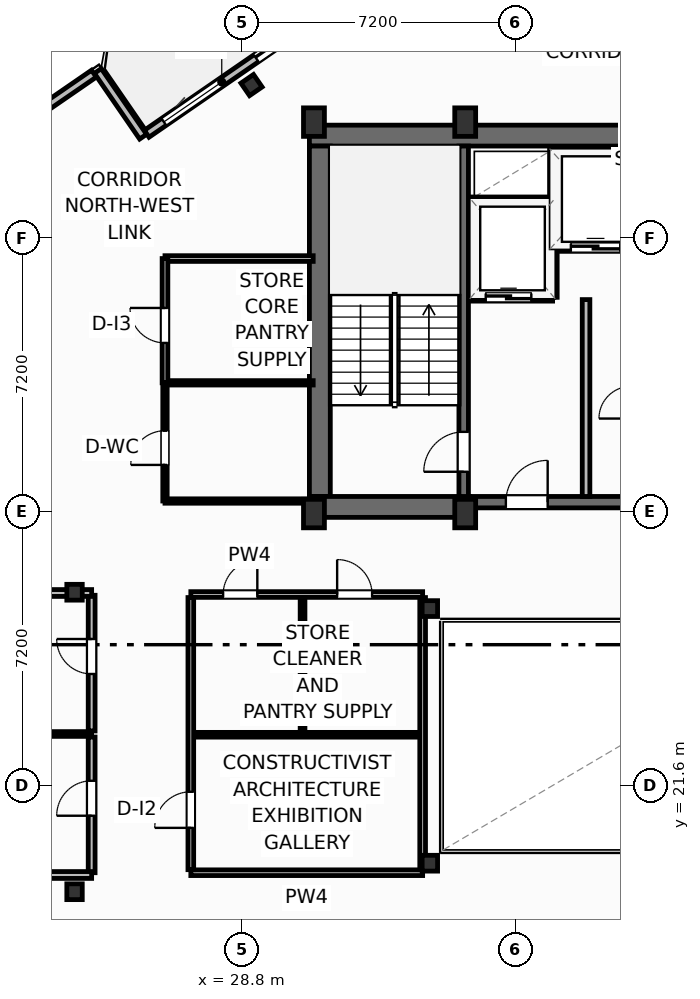
"""IFC4 building model, lengths in metres.
Left out: names, types, materials, properties, quantities, classifications, styles, units other than length and angle.
Written with IfcOpenShell. Run it as: python <this file> out.ifc"""

import sys

from ifc_helpers import new_model, si_unit, direction, frame, frame_2d, origin, origin_2d, place, context, subcontext, project, spatial, rectangle, i_section, extrude, element, fill, save


model = new_model("IFC4")
c1 = context("Model", 3, precision=1e-05, world=origin(), true_north=direction((0.0, 1.0)))
c2 = subcontext(c1, "Body", "Model", "MODEL_VIEW")
j1 = project(units=[si_unit("LENGTHUNIT", "METRE"), si_unit("PLANEANGLEUNIT", "RADIAN")], contexts=[c1])
p1 = place(None, origin())
s1 = spatial("IfcSite", under=j1, at=p1, CompositionType="ELEMENT")
p2 = place(p1, origin())
s2 = spatial("IfcBuilding", under=s1, at=p2, CompositionType="ELEMENT")
p3 = place(p2, frame((0.0, 0.0, 273.0)))
s3 = spatial("IfcBuildingStorey", under=s2, at=p3, CompositionType="ELEMENT", Elevation=273.0)
for number, where, z_axis, x_axis in (
    (1, (30.7, 28.75, 0.0), (0.0, 0.0, 1.0), (1.0, 0.0, 0.0)),
    (2, (34.68, 28.75, 0.0), (0.0, 0.0, 1.0), (1.0, 0.0, 0.0)),
    (3, (30.7, 39.05, 0.0), (0.0, 0.0, 1.0), (1.0, 0.0, 0.0)),
    (4, (34.68, 39.05, 0.0), (0.0, 0.0, 1.0), (1.0, 0.0, 0.0)),
):
    element("IfcColumn", number, at=place(p3, frame(where, z_axis=z_axis, x_axis=x_axis)), inside=s3, PredefinedType="COLUMN", context=c2, shape_type="SweptSolid", body=[
        extrude(rectangle(XDim=0.55, YDim=0.75, at=origin_2d()), origin(), (0.0, 0.0, 1.0), 3.7),
    ])
for number, where, z_axis, x_axis in (
    (5, (33.75, 19.55, 0.0), (0.0, 0.0, 1.0), (1.0, 0.0, 0.0)),
    (6, (33.75, 26.25, 0.0), (0.0, 0.0, 1.0), (1.0, 0.0, 0.0)),
    (7, (24.4, 18.8, 0.0), (0.0, 0.0, 1.0), (1.0, 0.0, 0.0)),
    (8, (24.4, 26.68, 0.0), (0.0, 0.0, 1.0), (1.0, 0.0, 0.0)),
):
    element("IfcColumn", number, at=place(p3, frame(where, z_axis=z_axis, x_axis=x_axis)), inside=s3, PredefinedType="COLUMN", context=c2, shape_type="SweptSolid", body=[
        extrude(i_section(OverallWidth=0.406, OverallDepth=0.416, WebThickness=0.03, FlangeThickness=0.048, FilletRadius=0.025, at=origin_2d()), origin(), (0.0, 0.0, 1.0), 3.7),
    ])
p4 = place(p3, frame((30.58, 38.695, 0.0), z_axis=(0.0, 0.0, 1.0), x_axis=(1.0, 0.0, 0.0)))
e9 = element("IfcWall", 9, at=p4, inside=s3, PredefinedType="SHEAR", context=c2, shape_type="SweptSolid", body=[
    extrude(rectangle(XDim=17.24, YDim=0.55, at=frame_2d((8.62, 0.0))), origin(), (0.0, 0.0, 1.0), 3.45),
])
p5 = place(p3, frame((30.855, 29.2, 0.0), z_axis=(0.0, 0.0, 1.0), x_axis=(0.0, 1.0, 0.0)))
e10 = element("IfcWall", 10, at=p5, inside=s3, PredefinedType="SHEAR", context=c2, shape_type="SweptSolid", body=[
    extrude(rectangle(XDim=9.22, YDim=0.55, at=frame_2d((4.61, 0.0))), origin(), (0.0, 0.0, 1.0), 3.45),
])
p6 = place(p3, frame((30.58, 28.925, 0.0), z_axis=(0.0, 0.0, 1.0), x_axis=(1.0, 0.0, 0.0)))
e11 = element("IfcWall", 11, at=p6, inside=s3, PredefinedType="SHEAR", context=c2, shape_type="SweptSolid", body=[
    extrude(rectangle(XDim=4.22, YDim=0.55, at=frame_2d((2.11, 0.0))), origin(), (0.0, 0.0, 1.0), 3.45),
])
p7 = place(p3, frame((34.8, 29.05, 0.0), z_axis=(0.0, 0.0, 1.0), x_axis=(1.0, 0.0, 0.0)))
e12 = element("IfcWall", 12, at=p7, inside=s3, PredefinedType="SHEAR", context=c2, shape_type="SweptSolid", body=[
    extrude(rectangle(XDim=8.8, YDim=0.3, at=frame_2d((4.4, 0.0))), origin(), (0.0, 0.0, 1.0), 3.45),
])
p8 = place(p7, frame((0.95, 0.0, 0.0)))
e13 = element("IfcOpeningElement", 13, at=p8, cuts=e12, PredefinedType="OPENING", context=c2, shape_type="SweptSolid", body=[
    extrude(rectangle(XDim=1.1, YDim=2.15, at=frame_2d((0.55, 1.075))), frame((0.0, 0.16, 0.0), z_axis=(0.0, -1.0, 0.0), x_axis=(1.0, 0.0, 0.0)), (0.0, 0.0, 1.0), 0.32),
])
p9 = place(p7, frame((6.75, 0.0, 0.0)))
e14 = element("IfcOpeningElement", 14, at=p9, cuts=e12, PredefinedType="OPENING", context=c2, shape_type="SweptSolid", body=[
    extrude(rectangle(XDim=1.1, YDim=2.15, at=frame_2d((0.55, 1.075))), frame((0.0, 0.16, 0.0), z_axis=(0.0, -1.0, 0.0), x_axis=(1.0, 0.0, 0.0)), (0.0, 0.0, 1.0), 0.32),
])
p10 = place(p7, frame((4.45, 0.0, 0.0)))
e15 = element("IfcOpeningElement", 15, at=p10, cuts=e12, PredefinedType="OPENING", context=c2, shape_type="SweptSolid", body=[
    extrude(rectangle(XDim=0.95, YDim=2.15, at=frame_2d((0.475, 1.075))), frame((0.0, 0.16, 0.0), z_axis=(0.0, -1.0, 0.0), x_axis=(1.0, 0.0, 0.0)), (0.0, 0.0, 1.0), 0.32),
])
p11 = place(p3, frame((34.64, 29.2, 0.0), z_axis=(0.0, 0.0, 1.0), x_axis=(0.0, 1.0, 0.0)))
e16 = element("IfcWall", 16, at=p11, inside=s3, PredefinedType="SHEAR", context=c2, shape_type="SweptSolid", body=[
    extrude(rectangle(XDim=9.22, YDim=0.25, at=frame_2d((4.61, 0.0))), origin(), (0.0, 0.0, 1.0), 3.45),
])
p12 = place(p11, frame((0.65, 0.0, 0.0)))
e17 = element("IfcOpeningElement", 17, at=p12, cuts=e16, PredefinedType="OPENING", context=c2, shape_type="SweptSolid", body=[
    extrude(rectangle(XDim=1.05, YDim=2.15, at=frame_2d((0.525, 1.075))), frame((0.0, 0.135, 0.0), z_axis=(0.0, -1.0, 0.0), x_axis=(1.0, 0.0, 0.0)), (0.0, 0.0, 1.0), 0.27),
])
p13 = place(p3, frame((29.057, 40.025, 0.0), z_axis=(0.0, 0.0, 1.0), x_axis=(0.823532597628, 0.567268949127, 0.0)))
e18 = element("IfcColumn", 18, at=p13, inside=s3, PredefinedType="COLUMN", context=c2, shape_type="SweptSolid", body=[
    extrude(i_section(OverallWidth=0.401, OverallDepth=0.399, WebThickness=0.025, FlangeThickness=0.04, FilletRadius=0.022, at=origin_2d()), origin(), (0.0, 0.0, 1.0), 3.7),
])
p14 = place(p3, frame((26.297, 38.743, 0.0), z_axis=(0.0, 0.0, 1.0), x_axis=(0.823534636215, 0.567265989598, 0.0)))
e19 = element("IfcWall", 19, at=p14, inside=s3, PredefinedType="SOLIDWALL", context=c2, shape_type="SweptSolid", body=[
    extrude(rectangle(XDim=6.0, YDim=0.22, at=frame_2d((3.0, 0.0))), origin(), (0.0, 0.0, 1.0), 2.73),
])
p15 = place(p14, frame((3.5, 0.0, 0.0)))
e20 = element("IfcOpeningElement", 20, at=p15, cuts=e19, PredefinedType="OPENING", context=c2, shape_type="SweptSolid", body=[
    extrude(rectangle(XDim=2.1, YDim=2.3, at=frame_2d((1.05, 1.15))), frame((0.0, 0.12, 0.0), z_axis=(0.0, -1.0, 0.0), x_axis=(1.0, 0.0, 0.0)), (0.0, 0.0, 1.0), 0.24),
])
p16 = place(p14, frame((0.55, 0.0, 0.75)))
e21 = element("IfcOpeningElement", 21, at=p16, cuts=e19, PredefinedType="OPENING", context=c2, shape_type="SweptSolid", body=[
    extrude(rectangle(XDim=1.85, YDim=1.75, at=frame_2d((0.925, 0.875))), frame((0.0, 0.12, 0.0), z_axis=(0.0, -1.0, 0.0), x_axis=(1.0, 0.0, 0.0)), (0.0, 0.0, 1.0), 0.24),
])
p17 = place(p3, frame((26.204, 38.667, 0.0), z_axis=(0.0, 0.0, 1.0), x_axis=(-0.567219383419, 0.823566737474, 0.0)))
e22 = element("IfcWall", 22, at=p17, inside=s3, PredefinedType="SOLIDWALL", context=c2, shape_type="SweptSolid", body=[
    extrude(rectangle(XDim=2.1, YDim=0.22, at=frame_2d((1.05, 0.0))), origin(), (0.0, 0.0, 1.0), 2.73),
])
p18 = place(p3, frame((24.91, 40.325, 0.0), z_axis=(0.0, 0.0, 1.0), x_axis=(-0.823521165086, -0.56728554596, 0.0)))
e23 = element("IfcWall", 23, at=p18, inside=s3, PredefinedType="SOLIDWALL", context=c2, shape_type="SweptSolid", body=[
    extrude(rectangle(XDim=8.035, YDim=0.22, at=frame_2d((4.018, 0.0))), origin(), (0.0, 0.0, 1.0), 2.73),
])
p19 = place(p18, frame((2.968, 0.0, 0.8)))
e24 = element("IfcOpeningElement", 24, at=p19, cuts=e23, PredefinedType="OPENING", context=c2, shape_type="SweptSolid", body=[
    extrude(rectangle(XDim=2.1, YDim=1.75, at=frame_2d((1.05, 0.875))), frame((0.0, 0.12, 0.0), z_axis=(0.0, -1.0, 0.0), x_axis=(1.0, 0.0, 0.0)), (0.0, 0.0, 1.0), 0.24),
])
p20 = place(p3, frame((24.85, 19.3, 0.0), z_axis=(0.0, 0.0, 1.0), x_axis=(0.0, 1.0, 0.0)))
e25 = element("IfcWall", 25, at=p20, inside=s3, PredefinedType="PARTITIONING", context=c2, shape_type="SweptSolid", body=[
    extrude(rectangle(XDim=3.57, YDim=0.18, at=frame_2d((1.785, 0.0))), origin(), (0.0, 0.0, 1.0), 3.45),
])
p21 = place(p20, frame((1.5, 0.0, 0.0)))
e26 = element("IfcOpeningElement", 26, at=p21, cuts=e25, PredefinedType="OPENING", context=c2, shape_type="SweptSolid", body=[
    extrude(rectangle(XDim=0.92, YDim=2.05, at=frame_2d((0.46, 1.025))), frame((0.0, 0.1, 0.0), z_axis=(0.0, -1.0, 0.0), x_axis=(1.0, 0.0, 0.0)), (0.0, 0.0, 1.0), 0.2),
])
p22 = place(p3, frame((24.85, 23.03, 0.0), z_axis=(0.0, 0.0, 1.0), x_axis=(0.0, 1.0, 0.0)))
e27 = element("IfcWall", 27, at=p22, inside=s3, PredefinedType="PARTITIONING", context=c2, shape_type="SweptSolid", body=[
    extrude(rectangle(XDim=3.57, YDim=0.18, at=frame_2d((1.785, 0.0))), origin(), (0.0, 0.0, 1.0), 3.45),
])
p23 = place(p22, frame((1.5, 0.0, 0.0)))
e28 = element("IfcOpeningElement", 28, at=p23, cuts=e27, PredefinedType="OPENING", context=c2, shape_type="SweptSolid", body=[
    extrude(rectangle(XDim=0.92, YDim=2.05, at=frame_2d((0.46, 1.025))), frame((0.0, 0.1, 0.0), z_axis=(0.0, -1.0, 0.0), x_axis=(1.0, 0.0, 0.0)), (0.0, 0.0, 1.0), 0.2),
])
p24 = place(p3, frame((2.424, 22.95, 0.0), z_axis=(0.0, 0.0, 1.0), x_axis=(1.0, 0.0, 0.0)))
e29 = element("IfcWall", 29, at=p24, inside=s3, PredefinedType="PARTITIONING", context=c2, shape_type="SweptSolid", body=[
    extrude(rectangle(XDim=22.426, YDim=0.125, at=frame_2d((11.213, 0.0))), origin(), (0.0, 0.0, 1.0), 3.45),
])
p25 = place(p3, frame((3.392, 19.24, 0.0), z_axis=(0.0, 0.0, 1.0), x_axis=(1.0, 0.0, 0.0)))
e30 = element("IfcWall", 30, at=p25, inside=s3, PredefinedType="PARTITIONING", context=c2, shape_type="SweptSolid", body=[
    extrude(rectangle(XDim=21.458, YDim=0.18, at=frame_2d((10.729, 0.0))), origin(), (0.0, 0.0, 1.0), 3.45),
])
p26 = place(p3, frame((5.107, 26.66, 0.0), z_axis=(0.0, 0.0, 1.0), x_axis=(1.0, 0.0, 0.0)))
e31 = element("IfcWall", 31, at=p26, inside=s3, PredefinedType="PARTITIONING", context=c2, shape_type="SweptSolid", body=[
    extrude(rectangle(XDim=19.743, YDim=0.18, at=frame_2d((9.872, 0.0))), origin(), (0.0, 0.0, 1.0), 2.662),
])
p27 = place(p3, frame((37.86, 29.2, 0.0), z_axis=(0.0, 0.0, 1.0), x_axis=(0.0, 1.0, 0.0)))
e32 = element("IfcWall", 32, at=p27, inside=s3, PredefinedType="PARTITIONING", context=c2, shape_type="SweptSolid", body=[
    extrude(rectangle(XDim=5.18, YDim=0.2, at=frame_2d((2.59, 0.0))), origin(), (0.0, 0.0, 1.0), 3.45),
])
p28 = place(p3, frame((34.8, 34.44, 0.0), z_axis=(0.0, 0.0, 1.0), x_axis=(1.0, 0.0, 0.0)))
e33 = element("IfcWall", 33, at=p28, inside=s3, PredefinedType="PARTITIONING", context=c2, shape_type="SweptSolid", body=[
    extrude(rectangle(XDim=2.18, YDim=0.2, at=frame_2d((1.09, 0.0))), origin(), (0.0, 0.0, 1.0), 3.45),
])
p29 = place(p28, frame((0.42, 0.0, 0.0)))
e34 = element("IfcOpeningElement", 34, at=p29, cuts=e33, PredefinedType="OPENING", context=c2, shape_type="SweptSolid", body=[
    extrude(rectangle(XDim=1.2, YDim=2.2, at=frame_2d((0.6, 1.1))), frame((0.0, 0.11, 0.0), z_axis=(0.0, -1.0, 0.0), x_axis=(1.0, 0.0, 0.0)), (0.0, 0.0, 1.0), 0.22),
])
p30 = place(p3, frame((34.8, 36.98, 0.0), z_axis=(0.0, 0.0, 1.0), x_axis=(1.0, 0.0, 0.0)))
e35 = element("IfcWall", 35, at=p30, inside=s3, PredefinedType="PARTITIONING", context=c2, shape_type="SweptSolid", body=[
    extrude(rectangle(XDim=2.18, YDim=0.2, at=frame_2d((1.09, 0.0))), origin(), (0.0, 0.0, 1.0), 3.45),
])
p31 = place(p3, frame((37.0, 34.44, 0.0), z_axis=(0.0, 0.0, 1.0), x_axis=(0.0, 1.0, 0.0)))
e36 = element("IfcWall", 36, at=p31, inside=s3, PredefinedType="PARTITIONING", context=c2, shape_type="SweptSolid", body=[
    extrude(rectangle(XDim=3.9, YDim=0.2, at=frame_2d((1.95, 0.0))), origin(), (0.0, 0.0, 1.0), 3.45),
])
p32 = place(p3, frame((37.06, 35.75, 0.0), z_axis=(0.0, 0.0, 1.0), x_axis=(1.0, 0.0, 0.0)))
e37 = element("IfcWall", 37, at=p32, inside=s3, PredefinedType="PARTITIONING", context=c2, shape_type="SweptSolid", body=[
    extrude(rectangle(XDim=2.12, YDim=0.2, at=frame_2d((1.06, 0.0))), origin(), (0.0, 0.0, 1.0), 3.45),
])
p33 = place(p32, frame((0.4, 0.0, 0.0)))
e38 = element("IfcOpeningElement", 38, at=p33, cuts=e37, PredefinedType="OPENING", context=c2, shape_type="SweptSolid", body=[
    extrude(rectangle(XDim=1.3, YDim=2.2, at=frame_2d((0.65, 1.1))), frame((0.0, 0.11, 0.0), z_axis=(0.0, -1.0, 0.0), x_axis=(1.0, 0.0, 0.0)), (0.0, 0.0, 1.0), 0.22),
])
p34 = place(p3, frame((27.46, 19.3, 0.0), z_axis=(0.0, 0.0, 1.0), x_axis=(1.0, 0.0, 0.0)))
e39 = element("IfcWall", 39, at=p34, inside=s3, PredefinedType="PARTITIONING", context=c2, shape_type="SweptSolid", body=[
    extrude(rectangle(XDim=6.1, YDim=0.15, at=frame_2d((3.05, 0.0))), origin(), (0.0, 0.0, 1.0), 2.662),
])
p35 = place(p3, frame((27.46, 26.62, 0.0), z_axis=(0.0, 0.0, 1.0), x_axis=(1.0, 0.0, 0.0)))
e40 = element("IfcWall", 40, at=p35, inside=s3, PredefinedType="PARTITIONING", context=c2, shape_type="SweptSolid", body=[
    extrude(rectangle(XDim=6.1, YDim=0.15, at=frame_2d((3.05, 0.0))), origin(), (0.0, 0.0, 1.0), 2.662),
])
p36 = place(p35, frame((0.85, 0.0, 0.0)))
e41 = element("IfcOpeningElement", 41, at=p36, cuts=e40, PredefinedType="OPENING", context=c2, shape_type="SweptSolid", body=[
    extrude(rectangle(XDim=0.9, YDim=2.05, at=frame_2d((0.45, 1.025))), frame((0.0, 0.085, 0.0), z_axis=(0.0, -1.0, 0.0), x_axis=(1.0, 0.0, 0.0)), (0.0, 0.0, 1.0), 0.17),
])
p37 = place(p35, frame((3.85, 0.0, 0.0)))
e42 = element("IfcOpeningElement", 42, at=p37, cuts=e40, PredefinedType="OPENING", context=c2, shape_type="SweptSolid", body=[
    extrude(rectangle(XDim=0.92, YDim=2.05, at=frame_2d((0.46, 1.025))), frame((0.0, 0.085, 0.0), z_axis=(0.0, -1.0, 0.0), x_axis=(1.0, 0.0, 0.0)), (0.0, 0.0, 1.0), 0.17),
])
p38 = place(p3, frame((27.52, 22.93, 0.0), z_axis=(0.0, 0.0, 1.0), x_axis=(1.0, 0.0, 0.0)))
e43 = element("IfcWall", 43, at=p38, inside=s3, PredefinedType="PARTITIONING", context=c2, shape_type="SweptSolid", body=[
    extrude(rectangle(XDim=6.0, YDim=0.125, at=frame_2d((3.0, 0.0))), origin(), (0.0, 0.0, 1.0), 3.45),
])
p39 = place(p3, frame((30.4, 23.0, 0.0), z_axis=(0.0, 0.0, 1.0), x_axis=(0.0, 1.0, 0.0)))
e44 = element("IfcWall", 44, at=p39, inside=s3, PredefinedType="PARTITIONING", context=c2, shape_type="SweptSolid", body=[
    extrude(rectangle(XDim=3.54, YDim=0.125, at=frame_2d((1.77, 0.0))), origin(), (0.0, 0.0, 1.0), 3.45),
])
p40 = place(p3, frame((27.46, 19.38, 0.0), z_axis=(0.0, 0.0, 1.0), x_axis=(0.0, 1.0, 0.0)))
e45 = element("IfcWall", 45, at=p40, inside=s3, PredefinedType="PARTITIONING", context=c2, shape_type="SweptSolid", body=[
    extrude(rectangle(XDim=7.16, YDim=0.15, at=frame_2d((3.58, 0.0))), origin(), (0.0, 0.0, 1.0), 3.45),
])
p41 = place(p40, frame((1.1, 0.0, 0.0)))
e46 = element("IfcOpeningElement", 46, at=p41, cuts=e45, PredefinedType="OPENING", context=c2, shape_type="SweptSolid", body=[
    extrude(rectangle(XDim=0.95, YDim=2.05, at=frame_2d((0.475, 1.025))), frame((0.0, 0.085, 0.0), z_axis=(0.0, -1.0, 0.0), x_axis=(1.0, 0.0, 0.0)), (0.0, 0.0, 1.0), 0.17),
])
p42 = place(p3, frame((33.56, 19.38, 0.0), z_axis=(0.0, 0.0, 1.0), x_axis=(0.0, 1.0, 0.0)))
e47 = element("IfcWall", 47, at=p42, inside=s3, PredefinedType="PARTITIONING", context=c2, shape_type="SweptSolid", body=[
    extrude(rectangle(XDim=7.16, YDim=0.15, at=frame_2d((3.58, 0.0))), origin(), (0.0, 0.0, 1.0), 2.824),
])
p43 = place(p3, frame((26.8, 32.19, 0.0), z_axis=(0.0, 0.0, 1.0), x_axis=(1.0, 0.0, 0.0)))
e48 = element("IfcWall", 48, at=p43, inside=s3, PredefinedType="PARTITIONING", context=c2, shape_type="SweptSolid", body=[
    extrude(rectangle(XDim=3.88, YDim=0.115, at=frame_2d((1.94, 0.0))), origin(), (0.0, 0.0, 1.0), 3.45),
])
p44 = place(p3, frame((26.78, 29.08, 0.0), z_axis=(0.0, 0.0, 1.0), x_axis=(1.0, 0.0, 0.0)))
e49 = element("IfcWall", 49, at=p44, inside=s3, PredefinedType="PARTITIONING", context=c2, shape_type="SweptSolid", body=[
    extrude(rectangle(XDim=3.8, YDim=0.115, at=frame_2d((1.9, 0.0))), origin(), (0.0, 0.0, 1.0), 3.45),
])
p45 = place(p3, frame((26.78, 35.46, 0.0), z_axis=(0.0, 0.0, 1.0), x_axis=(1.0, 0.0, 0.0)))
e50 = element("IfcWall", 50, at=p45, inside=s3, PredefinedType="PARTITIONING", context=c2, shape_type="SweptSolid", body=[
    extrude(rectangle(XDim=3.9, YDim=0.15, at=frame_2d((1.95, 0.0))), origin(), (0.0, 0.0, 1.0), 3.45),
])
p46 = place(p3, frame((26.78, 29.08, 0.0), z_axis=(0.0, 0.0, 1.0), x_axis=(0.0, 1.0, 0.0)))
e51 = element("IfcWall", 51, at=p46, inside=s3, PredefinedType="PARTITIONING", context=c2, shape_type="SweptSolid", body=[
    extrude(rectangle(XDim=3.11, YDim=0.115, at=frame_2d((1.555, 0.0))), origin(), (0.0, 0.0, 1.0), 3.45),
])
p47 = place(p46, frame((0.95, 0.0, 0.0)))
e52 = element("IfcOpeningElement", 52, at=p47, cuts=e51, PredefinedType="OPENING", context=c2, shape_type="SweptSolid", body=[
    extrude(rectangle(XDim=0.9, YDim=2.05, at=frame_2d((0.45, 1.025))), frame((0.0, 0.067, 0.0), z_axis=(0.0, -1.0, 0.0), x_axis=(1.0, 0.0, 0.0)), (0.0, 0.0, 1.0), 0.135),
])
p48 = place(p3, frame((26.78, 32.19, 0.0), z_axis=(0.0, 0.0, 1.0), x_axis=(0.0, 1.0, 0.0)))
e53 = element("IfcWall", 53, at=p48, inside=s3, PredefinedType="PARTITIONING", context=c2, shape_type="SweptSolid", body=[
    extrude(rectangle(XDim=3.27, YDim=0.15, at=frame_2d((1.635, 0.0))), origin(), (0.0, 0.0, 1.0), 3.45),
])
p49 = place(p48, frame((1.05, 0.0, 0.0)))
e54 = element("IfcOpeningElement", 54, at=p49, cuts=e53, PredefinedType="OPENING", context=c2, shape_type="SweptSolid", body=[
    extrude(rectangle(XDim=0.92, YDim=2.05, at=frame_2d((0.46, 1.025))), frame((0.0, 0.085, 0.0), z_axis=(0.0, -1.0, 0.0), x_axis=(1.0, 0.0, 0.0)), (0.0, 0.0, 1.0), 0.17),
])
p50 = place(p15, origin())
e55 = element("IfcDoor", 55, at=p50, inside=s3, OperationType="SLIDING_TO_LEFT", PredefinedType="DOOR", context=c2, shape_type="SweptSolid", body=[
    extrude(rectangle(XDim=2.1, YDim=2.3, at=frame_2d((1.05, 1.15))), frame((0.0, 0.025, 0.0), z_axis=(0.0, -1.0, 0.0), x_axis=(1.0, 0.0, 0.0)), (0.0, 0.0, 1.0), 0.05),
])
fill(e20, e55)
p51 = place(p16, origin())
e56 = element("IfcWindow", 56, at=p51, inside=s3, PartitioningType="SINGLE_PANEL", PredefinedType="WINDOW", context=c2, shape_type="SweptSolid", body=[
    extrude(rectangle(XDim=1.85, YDim=1.75, at=frame_2d((0.925, 0.875))), frame((0.0, 0.03, 0.0), z_axis=(0.0, -1.0, 0.0), x_axis=(1.0, 0.0, 0.0)), (0.0, 0.0, 1.0), 0.06),
])
fill(e21, e56)
p52 = place(p21, origin())
e57 = element("IfcDoor", 57, at=p52, inside=s3, OperationType="SINGLE_SWING_LEFT", PredefinedType="DOOR", context=c2, shape_type="SweptSolid", body=[
    extrude(rectangle(XDim=0.92, YDim=2.05, at=frame_2d((0.46, 1.025))), frame((0.0, 0.025, 0.0), z_axis=(0.0, -1.0, 0.0), x_axis=(1.0, 0.0, 0.0)), (0.0, 0.0, 1.0), 0.05),
])
fill(e26, e57)
p53 = place(p23, origin())
e58 = element("IfcDoor", 58, at=p53, inside=s3, OperationType="SINGLE_SWING_RIGHT", PredefinedType="DOOR", context=c2, shape_type="SweptSolid", body=[
    extrude(rectangle(XDim=0.92, YDim=2.05, at=frame_2d((0.46, 1.025))), frame((0.0, 0.025, 0.0), z_axis=(0.0, -1.0, 0.0), x_axis=(1.0, 0.0, 0.0)), (0.0, 0.0, 1.0), 0.05),
])
fill(e28, e58)
p54 = place(p12, origin())
e59 = element("IfcDoor", 59, at=p54, inside=s3, OperationType="SINGLE_SWING_LEFT", PredefinedType="DOOR", context=c2, shape_type="SweptSolid", body=[
    extrude(rectangle(XDim=1.05, YDim=2.15, at=frame_2d((0.525, 1.075))), frame((0.0, 0.025, 0.0), z_axis=(0.0, -1.0, 0.0), x_axis=(1.0, 0.0, 0.0)), (0.0, 0.0, 1.0), 0.05),
])
fill(e17, e59)
p55 = place(p8, origin())
e60 = element("IfcDoor", 60, at=p55, inside=s3, OperationType="SINGLE_SWING_RIGHT", PredefinedType="DOOR", context=c2, shape_type="SweptSolid", body=[
    extrude(rectangle(XDim=1.1, YDim=2.15, at=frame_2d((0.55, 1.075))), frame((0.0, 0.025, 0.0), z_axis=(0.0, -1.0, 0.0), x_axis=(1.0, 0.0, 0.0)), (0.0, 0.0, 1.0), 0.05),
])
fill(e13, e60)
p56 = place(p29, origin())
e61 = element("IfcDoor", 61, at=p56, inside=s3, OperationType="SLIDING_TO_LEFT", PredefinedType="DOOR", context=c2, shape_type="SweptSolid", body=[
    extrude(rectangle(XDim=1.2, YDim=2.2, at=frame_2d((0.6, 1.1))), frame((0.0, 0.025, 0.0), z_axis=(0.0, -1.0, 0.0), x_axis=(1.0, 0.0, 0.0)), (0.0, 0.0, 1.0), 0.05),
])
fill(e34, e61)
p57 = place(p33, origin())
e62 = element("IfcDoor", 62, at=p57, inside=s3, OperationType="SLIDING_TO_LEFT", PredefinedType="DOOR", context=c2, shape_type="SweptSolid", body=[
    extrude(rectangle(XDim=1.3, YDim=2.2, at=frame_2d((0.65, 1.1))), frame((0.0, 0.025, 0.0), z_axis=(0.0, -1.0, 0.0), x_axis=(1.0, 0.0, 0.0)), (0.0, 0.0, 1.0), 0.05),
])
fill(e38, e62)
p58 = place(p36, origin())
e63 = element("IfcDoor", 63, at=p58, inside=s3, OperationType="SINGLE_SWING_RIGHT", PredefinedType="DOOR", context=c2, shape_type="SweptSolid", body=[
    extrude(rectangle(XDim=0.9, YDim=2.05, at=frame_2d((0.45, 1.025))), frame((0.0, 0.025, 0.0), z_axis=(0.0, -1.0, 0.0), x_axis=(1.0, 0.0, 0.0)), (0.0, 0.0, 1.0), 0.05),
])
fill(e41, e63)
p59 = place(p37, origin())
e64 = element("IfcDoor", 64, at=p59, inside=s3, OperationType="SINGLE_SWING_LEFT", PredefinedType="DOOR", context=c2, shape_type="SweptSolid", body=[
    extrude(rectangle(XDim=0.92, YDim=2.05, at=frame_2d((0.46, 1.025))), frame((0.0, 0.025, 0.0), z_axis=(0.0, -1.0, 0.0), x_axis=(1.0, 0.0, 0.0)), (0.0, 0.0, 1.0), 0.05),
])
fill(e42, e64)
p60 = place(p41, origin())
e65 = element("IfcDoor", 65, at=p60, inside=s3, OperationType="SINGLE_SWING_LEFT", PredefinedType="DOOR", context=c2, shape_type="SweptSolid", body=[
    extrude(rectangle(XDim=0.95, YDim=2.05, at=frame_2d((0.475, 1.025))), frame((0.0, 0.025, 0.0), z_axis=(0.0, -1.0, 0.0), x_axis=(1.0, 0.0, 0.0)), (0.0, 0.0, 1.0), 0.05),
])
fill(e46, e65)
p61 = place(p47, origin())
e66 = element("IfcDoor", 66, at=p61, inside=s3, OperationType="SINGLE_SWING_LEFT", PredefinedType="DOOR", context=c2, shape_type="SweptSolid", body=[
    extrude(rectangle(XDim=0.9, YDim=2.05, at=frame_2d((0.45, 1.025))), frame((0.0, 0.025, 0.0), z_axis=(0.0, -1.0, 0.0), x_axis=(1.0, 0.0, 0.0)), (0.0, 0.0, 1.0), 0.05),
])
fill(e52, e66)
p62 = place(p49, origin())
e67 = element("IfcDoor", 67, at=p62, inside=s3, OperationType="SINGLE_SWING_RIGHT", PredefinedType="DOOR", context=c2, shape_type="SweptSolid", body=[
    extrude(rectangle(XDim=0.92, YDim=2.05, at=frame_2d((0.46, 1.025))), frame((0.0, 0.025, 0.0), z_axis=(0.0, -1.0, 0.0), x_axis=(1.0, 0.0, 0.0)), (0.0, 0.0, 1.0), 0.05),
])
fill(e54, e67)
save(model, sys.argv[1])
